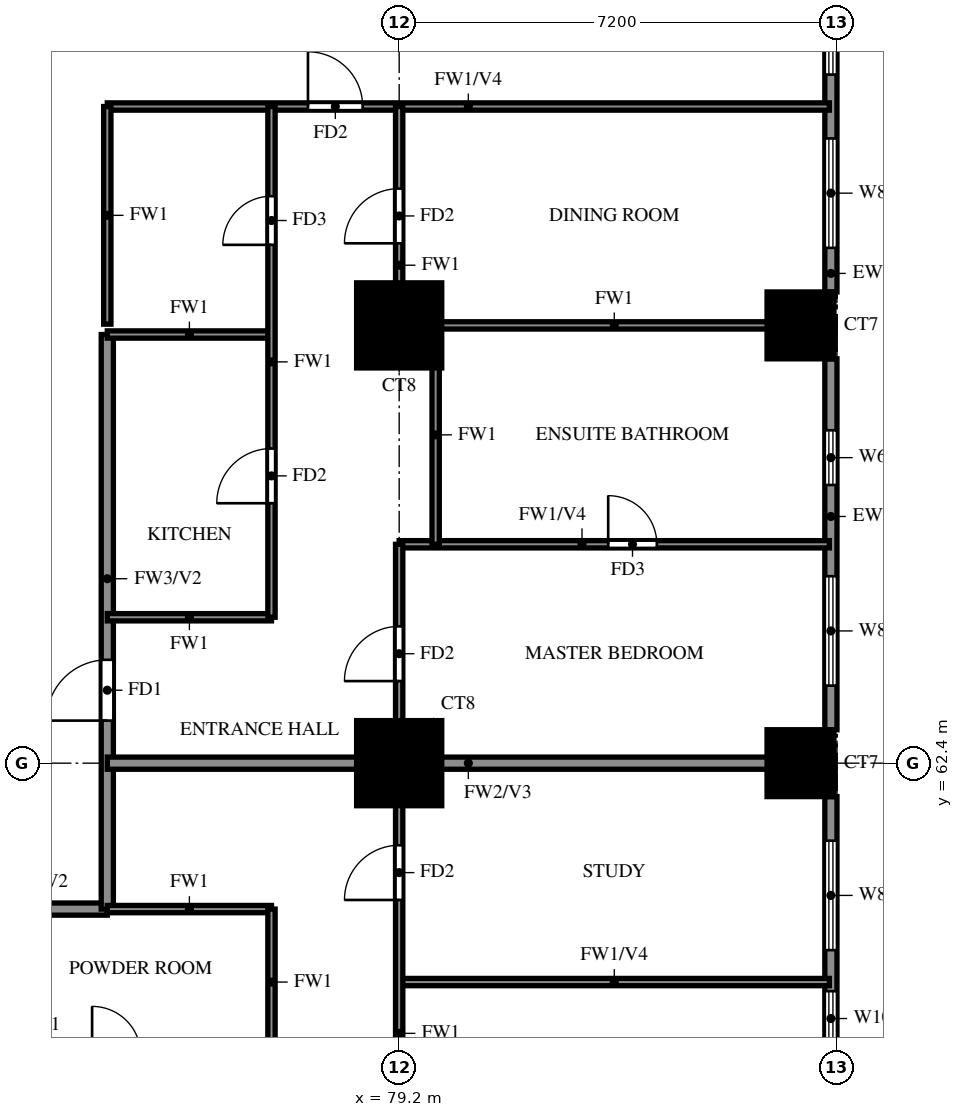
"""IFC4 building model, lengths in metres.
Left out: names, types, materials, properties, quantities, classifications, styles, units other than length and angle.
Written with IfcOpenShell. Run it as: python <this file> out.ifc"""

import sys

from ifc_helpers import new_model, si_unit, direction, frame, frame_2d, origin, origin_2d, place, context, subcontext, project, spatial, rectangle, extrude, source, transform, mapped, element, fill, save


model = new_model("IFC4")
c1 = context("Model", 3, precision=1e-05, world=origin(), true_north=direction((0.0, 1.0)))
c2 = subcontext(c1, "Body", "Model", "MODEL_VIEW")
j1 = project(units=[si_unit("LENGTHUNIT", "METRE"), si_unit("PLANEANGLEUNIT", "RADIAN")], contexts=[c1])
p1 = place(None, origin())
s1 = spatial("IfcSite", under=j1, at=p1, CompositionType="ELEMENT")
p2 = place(p1, origin())
s2 = spatial("IfcBuilding", under=s1, at=p2, CompositionType="ELEMENT")
p3 = place(p2, frame((0.0, 0.0, 44.5)))
s3 = spatial("IfcBuildingStorey", under=s2, at=p3, CompositionType="ELEMENT", Elevation=44.5)
m1 = source(origin(), c2, "Body", "SweptSolid", [
    extrude(rectangle(XDim=1.4, YDim=1.4, at=origin_2d()), origin(), (0.0, 0.0, 1.0), 3.18),
])
p4 = place(p3, frame((79.2, 62.4, 0.0), z_axis=(0.0, 0.0, 1.0), x_axis=(1.0, 0.0, 0.0)))
e1 = element("IfcColumn", 1, at=p4, inside=s3, PredefinedType="COLUMN", context=c2, shape_type="MappedRepresentation", body=[
    mapped(m1, transform((0.0, 0.0, 0.0))),
])
m2 = source(origin(), c2, "Body", "SweptSolid", [
    extrude(rectangle(XDim=1.1, YDim=1.1, at=origin_2d()), origin(), (0.0, 0.0, 1.0), 3.18),
])
p5 = place(p3, frame((85.8, 62.4, 0.0), z_axis=(0.0, 0.0, 1.0), x_axis=(1.0, 0.0, 0.0)))
e2 = element("IfcColumn", 2, at=p5, inside=s3, PredefinedType="COLUMN", context=c2, shape_type="MappedRepresentation", body=[
    mapped(m2, transform((0.0, 0.0, 0.0))),
])
p6 = place(p3, frame((79.2, 69.6, 0.0), z_axis=(0.0, 0.0, 1.0), x_axis=(1.0, 0.0, 0.0)))
e3 = element("IfcColumn", 3, at=p6, inside=s3, PredefinedType="COLUMN", context=c2, shape_type="MappedRepresentation", body=[
    mapped(m1, transform((0.0, 0.0, 0.0))),
])
p7 = place(p3, frame((85.8, 69.6, 0.0), z_axis=(0.0, 0.0, 1.0), x_axis=(1.0, 0.0, 0.0)))
e4 = element("IfcColumn", 4, at=p7, inside=s3, PredefinedType="COLUMN", context=c2, shape_type="MappedRepresentation", body=[
    mapped(m2, transform((0.0, 0.0, 0.0))),
])
p8 = place(p3, frame((86.3, 55.75, 0.0), z_axis=(0.0, 0.0, 1.0), x_axis=(0.0, 1.0, 0.0)))
e5 = element("IfcWall", 5, at=p8, inside=s3, PredefinedType="SOLIDWALL", context=c2, shape_type="SweptSolid", body=[
    extrude(rectangle(XDim=6.1, YDim=0.2, at=frame_2d((3.05, 0.0))), origin(), (0.0, 0.0, 1.0), 3.18),
])
p9 = place(p8, frame((2.0, 0.0, 0.6)))
e6 = element("IfcOpeningElement", 6, at=p9, cuts=e5, PredefinedType="OPENING", context=c2, shape_type="SweptSolid", body=[
    extrude(rectangle(XDim=0.9, YDim=2.4, at=frame_2d((0.45, 1.2))), frame((0.0, 0.11, 0.0), z_axis=(0.0, -1.0, 0.0), x_axis=(1.0, 0.0, 0.0)), (0.0, 0.0, 1.0), 0.22),
])
p10 = place(p8, frame((3.575, 0.0, 0.6)))
e7 = element("IfcOpeningElement", 7, at=p10, cuts=e5, PredefinedType="OPENING", context=c2, shape_type="SweptSolid", body=[
    extrude(rectangle(XDim=1.8, YDim=2.4, at=frame_2d((0.9, 1.2))), frame((0.0, 0.11, 0.0), z_axis=(0.0, -1.0, 0.0), x_axis=(1.0, 0.0, 0.0)), (0.0, 0.0, 1.0), 0.22),
])
p11 = place(p3, frame((86.3, 62.95, 0.0), z_axis=(0.0, 0.0, 1.0), x_axis=(0.0, 1.0, 0.0)))
e8 = element("IfcWall", 8, at=p11, inside=s3, PredefinedType="SOLIDWALL", context=c2, shape_type="SweptSolid", body=[
    extrude(rectangle(XDim=6.1, YDim=0.2, at=frame_2d((3.05, 0.0))), origin(), (0.0, 0.0, 1.0), 3.18),
])
p12 = place(p11, frame((0.725, 0.0, 0.6)))
e9 = element("IfcOpeningElement", 9, at=p12, cuts=e8, PredefinedType="OPENING", context=c2, shape_type="SweptSolid", body=[
    extrude(rectangle(XDim=1.8, YDim=2.4, at=frame_2d((0.9, 1.2))), frame((0.0, 0.11, 0.0), z_axis=(0.0, -1.0, 0.0), x_axis=(1.0, 0.0, 0.0)), (0.0, 0.0, 1.0), 0.22),
])
p13 = place(p11, frame((4.025, 0.0, 1.5)))
e10 = element("IfcOpeningElement", 10, at=p13, cuts=e8, PredefinedType="OPENING", context=c2, shape_type="SweptSolid", body=[
    extrude(rectangle(XDim=0.9, YDim=0.9, at=frame_2d((0.45, 0.45))), frame((0.0, 0.11, 0.0), z_axis=(0.0, -1.0, 0.0), x_axis=(1.0, 0.0, 0.0)), (0.0, 0.0, 1.0), 0.22),
])
p14 = place(p3, frame((86.3, 70.15, 0.0), z_axis=(0.0, 0.0, 1.0), x_axis=(0.0, 1.0, 0.0)))
e11 = element("IfcWall", 11, at=p14, inside=s3, PredefinedType="SOLIDWALL", context=c2, shape_type="SweptSolid", body=[
    extrude(rectangle(XDim=6.1, YDim=0.2, at=frame_2d((3.05, 0.0))), origin(), (0.0, 0.0, 1.0), 3.18),
])
p15 = place(p14, frame((0.725, 0.0, 0.6)))
e12 = element("IfcOpeningElement", 12, at=p15, cuts=e11, PredefinedType="OPENING", context=c2, shape_type="SweptSolid", body=[
    extrude(rectangle(XDim=1.8, YDim=2.4, at=frame_2d((0.9, 1.2))), frame((0.0, 0.11, 0.0), z_axis=(0.0, -1.0, 0.0), x_axis=(1.0, 0.0, 0.0)), (0.0, 0.0, 1.0), 0.22),
])
p16 = place(p14, frame((3.575, 0.0, 0.6)))
e13 = element("IfcOpeningElement", 13, at=p16, cuts=e11, PredefinedType="OPENING", context=c2, shape_type="SweptSolid", body=[
    extrude(rectangle(XDim=1.8, YDim=2.4, at=frame_2d((0.9, 1.2))), frame((0.0, 0.11, 0.0), z_axis=(0.0, -1.0, 0.0), x_axis=(1.0, 0.0, 0.0)), (0.0, 0.0, 1.0), 0.22),
])
p17 = place(p3, frame((72.0, 60.0, 0.0), z_axis=(0.0, 0.0, 1.0), x_axis=(1.0, 0.0, 0.0)))
e14 = element("IfcWall", 14, at=p17, inside=s3, PredefinedType="SOLIDWALL", context=c2, shape_type="SweptSolid", body=[
    extrude(rectangle(XDim=2.4, YDim=0.2, at=frame_2d((1.2, 0.0))), origin(), (0.0, 0.0, 1.0), 3.18),
])
p18 = place(p3, frame((74.4, 60.0, 0.0), z_axis=(0.0, 0.0, 1.0), x_axis=(0.0, 1.0, 0.0)))
e15 = element("IfcWall", 15, at=p18, inside=s3, PredefinedType="SOLIDWALL", context=c2, shape_type="SweptSolid", body=[
    extrude(rectangle(XDim=9.45, YDim=0.2, at=frame_2d((4.725, 0.0))), origin(), (0.0, 0.0, 1.0), 3.18),
])
p19 = place(p18, frame((3.1, 0.0, 0.0)))
e16 = element("IfcOpeningElement", 16, at=p19, cuts=e15, PredefinedType="OPENING", context=c2, shape_type="SweptSolid", body=[
    extrude(rectangle(XDim=1.0, YDim=2.1, at=frame_2d((0.5, 1.05))), frame((0.0, 0.11, 0.0), z_axis=(0.0, -1.0, 0.0), x_axis=(1.0, 0.0, 0.0)), (0.0, 0.0, 1.0), 0.22),
])
p20 = place(p3, frame((74.4, 62.4, 0.0), z_axis=(0.0, 0.0, 1.0), x_axis=(1.0, 0.0, 0.0)))
e17 = element("IfcWall", 17, at=p20, inside=s3, PredefinedType="SOLIDWALL", context=c2, shape_type="SweptSolid", body=[
    extrude(rectangle(XDim=11.875, YDim=0.2, at=frame_2d((5.938, 0.0))), origin(), (0.0, 0.0, 1.0), 3.18),
])
p21 = place(p3, frame((79.2, 58.8, 0.0), z_axis=(0.0, 0.0, 1.0), x_axis=(1.0, 0.0, 0.0)))
e18 = element("IfcWall", 18, at=p21, inside=s3, PredefinedType="PARTITIONING", context=c2, shape_type="SweptSolid", body=[
    extrude(rectangle(XDim=7.075, YDim=0.12, at=frame_2d((3.538, 0.0))), origin(), (0.0, 0.0, 1.0), 2.28),
])
for number, where, z_axis, x_axis in (
    (19, (74.4, 60.0, 0.0), (0.0, 0.0, 1.0), (1.0, 0.0, 0.0)),
    (20, (74.4, 64.8, 0.0), (0.0, 0.0, 1.0), (1.0, 0.0, 0.0)),
):
    element("IfcWall", number, at=place(p3, frame(where, z_axis=z_axis, x_axis=x_axis)), inside=s3, PredefinedType="PARTITIONING", context=c2, shape_type="SweptSolid", body=[
        extrude(rectangle(XDim=2.7, YDim=0.12, at=frame_2d((1.35, 0.0))), origin(), (0.0, 0.0, 1.0), 3.18),
    ])
p22 = place(p3, frame((79.2, 66.0, 0.0), z_axis=(0.0, 0.0, 1.0), x_axis=(1.0, 0.0, 0.0)))
e21 = element("IfcWall", 21, at=p22, inside=s3, PredefinedType="PARTITIONING", context=c2, shape_type="SweptSolid", body=[
    extrude(rectangle(XDim=7.075, YDim=0.12, at=frame_2d((3.538, 0.0))), origin(), (0.0, 0.0, 1.0), 2.28),
])
p23 = place(p22, frame((3.438, 0.0, 0.0)))
e22 = element("IfcOpeningElement", 22, at=p23, cuts=e21, PredefinedType="OPENING", context=c2, shape_type="SweptSolid", body=[
    extrude(rectangle(XDim=0.8, YDim=2.1, at=frame_2d((0.4, 1.05))), frame((0.0, 0.07, 0.0), z_axis=(0.0, -1.0, 0.0), x_axis=(1.0, 0.0, 0.0)), (0.0, 0.0, 1.0), 0.14),
])
p24 = place(p3, frame((74.4, 69.45, 0.0), z_axis=(0.0, 0.0, 1.0), x_axis=(1.0, 0.0, 0.0)))
e23 = element("IfcWall", 23, at=p24, inside=s3, PredefinedType="PARTITIONING", context=c2, shape_type="SweptSolid", body=[
    extrude(rectangle(XDim=2.7, YDim=0.12, at=frame_2d((1.35, 0.0))), origin(), (0.0, 0.0, 1.0), 3.18),
])
p25 = place(p3, frame((79.2, 69.6, 0.0), z_axis=(0.0, 0.0, 1.0), x_axis=(1.0, 0.0, 0.0)))
e24 = element("IfcWall", 24, at=p25, inside=s3, PredefinedType="PARTITIONING", context=c2, shape_type="SweptSolid", body=[
    extrude(rectangle(XDim=7.075, YDim=0.12, at=frame_2d((3.538, 0.0))), origin(), (0.0, 0.0, 1.0), 3.18),
])
p26 = place(p3, frame((74.4, 73.2, 0.0), z_axis=(0.0, 0.0, 1.0), x_axis=(1.0, 0.0, 0.0)))
e25 = element("IfcWall", 25, at=p26, inside=s3, PredefinedType="PARTITIONING", context=c2, shape_type="SweptSolid", body=[
    extrude(rectangle(XDim=11.875, YDim=0.12, at=frame_2d((5.938, 0.0))), origin(), (0.0, 0.0, 1.0), 2.28),
])
p27 = place(p26, frame((3.3, 0.0, 0.0)))
e26 = element("IfcOpeningElement", 26, at=p27, cuts=e25, PredefinedType="OPENING", context=c2, shape_type="SweptSolid", body=[
    extrude(rectangle(XDim=0.9, YDim=2.1, at=frame_2d((0.45, 1.05))), frame((0.0, 0.07, 0.0), z_axis=(0.0, -1.0, 0.0), x_axis=(1.0, 0.0, 0.0)), (0.0, 0.0, 1.0), 0.14),
])
p28 = place(p3, frame((74.4, 69.62, 0.0), z_axis=(0.0, 0.0, 1.0), x_axis=(0.0, 1.0, 0.0)))
e27 = element("IfcWall", 27, at=p28, inside=s3, PredefinedType="PARTITIONING", context=c2, shape_type="SweptSolid", body=[
    extrude(rectangle(XDim=3.58, YDim=0.12, at=frame_2d((1.79, 0.0))), origin(), (0.0, 0.0, 1.0), 3.18),
])
p29 = place(p3, frame((77.1, 57.6, 0.0), z_axis=(0.0, 0.0, 1.0), x_axis=(0.0, 1.0, 0.0)))
e28 = element("IfcWall", 28, at=p29, inside=s3, PredefinedType="PARTITIONING", context=c2, shape_type="SweptSolid", body=[
    extrude(rectangle(XDim=2.4, YDim=0.12, at=frame_2d((1.2, 0.0))), origin(), (0.0, 0.0, 1.0), 3.18),
])
p30 = place(p3, frame((77.1, 64.8, 0.0), z_axis=(0.0, 0.0, 1.0), x_axis=(0.0, 1.0, 0.0)))
e29 = element("IfcWall", 29, at=p30, inside=s3, PredefinedType="PARTITIONING", context=c2, shape_type="SweptSolid", body=[
    extrude(rectangle(XDim=8.4, YDim=0.12, at=frame_2d((4.2, 0.0))), origin(), (0.0, 0.0, 1.0), 3.18),
])
p31 = place(p30, frame((1.875, 0.0, 0.0)))
e30 = element("IfcOpeningElement", 30, at=p31, cuts=e29, PredefinedType="OPENING", context=c2, shape_type="SweptSolid", body=[
    extrude(rectangle(XDim=0.9, YDim=2.1, at=frame_2d((0.45, 1.05))), frame((0.0, 0.07, 0.0), z_axis=(0.0, -1.0, 0.0), x_axis=(1.0, 0.0, 0.0)), (0.0, 0.0, 1.0), 0.14),
])
p32 = place(p30, frame((6.125, 0.0, 0.0)))
e31 = element("IfcOpeningElement", 31, at=p32, cuts=e29, PredefinedType="OPENING", context=c2, shape_type="SweptSolid", body=[
    extrude(rectangle(XDim=0.8, YDim=2.1, at=frame_2d((0.4, 1.05))), frame((0.0, 0.07, 0.0), z_axis=(0.0, -1.0, 0.0), x_axis=(1.0, 0.0, 0.0)), (0.0, 0.0, 1.0), 0.14),
])
p33 = place(p3, frame((79.2, 48.125, 0.0), z_axis=(0.0, 0.0, 1.0), x_axis=(0.0, 1.0, 0.0)))
e32 = element("IfcWall", 32, at=p33, inside=s3, PredefinedType="PARTITIONING", context=c2, shape_type="SweptSolid", body=[
    extrude(rectangle(XDim=17.875, YDim=0.12, at=frame_2d((8.938, 0.0))), origin(), (0.0, 0.0, 1.0), 3.18),
])
p34 = place(p33, frame((1.288, 0.0, 0.0)))
e33 = element("IfcOpeningElement", 33, at=p34, cuts=e32, PredefinedType="OPENING", context=c2, shape_type="SweptSolid", body=[
    extrude(rectangle(XDim=0.9, YDim=2.1, at=frame_2d((0.45, 1.05))), frame((0.0, 0.07, 0.0), z_axis=(0.0, -1.0, 0.0), x_axis=(1.0, 0.0, 0.0)), (0.0, 0.0, 1.0), 0.14),
])
p35 = place(p33, frame((7.825, 0.0, 0.0)))
e34 = element("IfcOpeningElement", 34, at=p35, cuts=e32, PredefinedType="OPENING", context=c2, shape_type="SweptSolid", body=[
    extrude(rectangle(XDim=1.5, YDim=2.1, at=frame_2d((0.75, 1.05))), frame((0.0, 0.07, 0.0), z_axis=(0.0, -1.0, 0.0), x_axis=(1.0, 0.0, 0.0)), (0.0, 0.0, 1.0), 0.14),
])
p36 = place(p33, frame((12.025, 0.0, 0.0)))
e35 = element("IfcOpeningElement", 35, at=p36, cuts=e32, PredefinedType="OPENING", context=c2, shape_type="SweptSolid", body=[
    extrude(rectangle(XDim=0.9, YDim=2.1, at=frame_2d((0.45, 1.05))), frame((0.0, 0.07, 0.0), z_axis=(0.0, -1.0, 0.0), x_axis=(1.0, 0.0, 0.0)), (0.0, 0.0, 1.0), 0.14),
])
p37 = place(p33, frame((15.625, 0.0, 0.0)))
e36 = element("IfcOpeningElement", 36, at=p37, cuts=e32, PredefinedType="OPENING", context=c2, shape_type="SweptSolid", body=[
    extrude(rectangle(XDim=0.9, YDim=2.1, at=frame_2d((0.45, 1.05))), frame((0.0, 0.07, 0.0), z_axis=(0.0, -1.0, 0.0), x_axis=(1.0, 0.0, 0.0)), (0.0, 0.0, 1.0), 0.14),
])
p38 = place(p3, frame((79.2, 69.6, 0.0), z_axis=(0.0, 0.0, 1.0), x_axis=(0.0, 1.0, 0.0)))
e37 = element("IfcWall", 37, at=p38, inside=s3, PredefinedType="PARTITIONING", context=c2, shape_type="SweptSolid", body=[
    extrude(rectangle(XDim=3.6, YDim=0.12, at=frame_2d((1.8, 0.0))), origin(), (0.0, 0.0, 1.0), 3.18),
])
p39 = place(p38, frame((1.35, 0.0, 0.0)))
e38 = element("IfcOpeningElement", 38, at=p39, cuts=e37, PredefinedType="OPENING", context=c2, shape_type="SweptSolid", body=[
    extrude(rectangle(XDim=0.9, YDim=2.1, at=frame_2d((0.45, 1.05))), frame((0.0, 0.07, 0.0), z_axis=(0.0, -1.0, 0.0), x_axis=(1.0, 0.0, 0.0)), (0.0, 0.0, 1.0), 0.14),
])
p40 = place(p3, frame((79.8, 66.0, 0.0), z_axis=(0.0, 0.0, 1.0), x_axis=(0.0, 1.0, 0.0)))
e39 = element("IfcWall", 39, at=p40, inside=s3, PredefinedType="PARTITIONING", context=c2, shape_type="SweptSolid", body=[
    extrude(rectangle(XDim=3.6, YDim=0.12, at=frame_2d((1.8, 0.0))), origin(), (0.0, 0.0, 1.0), 3.18),
])
p41 = place(p9, origin())
e40 = element("IfcWindow", 40, at=p41, inside=s3, PartitioningType="SINGLE_PANEL", PredefinedType="WINDOW", context=c2, shape_type="SweptSolid", body=[
    extrude(rectangle(XDim=0.9, YDim=2.4, at=frame_2d((0.45, 1.2))), frame((0.0, 0.03, 0.0), z_axis=(0.0, -1.0, 0.0), x_axis=(1.0, 0.0, 0.0)), (0.0, 0.0, 1.0), 0.06),
])
fill(e6, e40)
p42 = place(p10, origin())
e41 = element("IfcWindow", 41, at=p42, inside=s3, PartitioningType="DOUBLE_PANEL_VERTICAL", PredefinedType="WINDOW", context=c2, shape_type="SweptSolid", body=[
    extrude(rectangle(XDim=1.8, YDim=2.4, at=frame_2d((0.9, 1.2))), frame((0.0, 0.03, 0.0), z_axis=(0.0, -1.0, 0.0), x_axis=(1.0, 0.0, 0.0)), (0.0, 0.0, 1.0), 0.06),
])
fill(e7, e41)
p43 = place(p12, origin())
e42 = element("IfcWindow", 42, at=p43, inside=s3, PartitioningType="DOUBLE_PANEL_VERTICAL", PredefinedType="WINDOW", context=c2, shape_type="SweptSolid", body=[
    extrude(rectangle(XDim=1.8, YDim=2.4, at=frame_2d((0.9, 1.2))), frame((0.0, 0.03, 0.0), z_axis=(0.0, -1.0, 0.0), x_axis=(1.0, 0.0, 0.0)), (0.0, 0.0, 1.0), 0.06),
])
fill(e9, e42)
p44 = place(p13, origin())
e43 = element("IfcWindow", 43, at=p44, inside=s3, PartitioningType="SINGLE_PANEL", PredefinedType="WINDOW", context=c2, shape_type="SweptSolid", body=[
    extrude(rectangle(XDim=0.9, YDim=0.9, at=frame_2d((0.45, 0.45))), frame((0.0, 0.03, 0.0), z_axis=(0.0, -1.0, 0.0), x_axis=(1.0, 0.0, 0.0)), (0.0, 0.0, 1.0), 0.06),
])
fill(e10, e43)
p45 = place(p15, origin())
e44 = element("IfcWindow", 44, at=p45, inside=s3, PartitioningType="DOUBLE_PANEL_VERTICAL", PredefinedType="WINDOW", context=c2, shape_type="SweptSolid", body=[
    extrude(rectangle(XDim=1.8, YDim=2.4, at=frame_2d((0.9, 1.2))), frame((0.0, 0.03, 0.0), z_axis=(0.0, -1.0, 0.0), x_axis=(1.0, 0.0, 0.0)), (0.0, 0.0, 1.0), 0.06),
])
fill(e12, e44)
p46 = place(p16, origin())
e45 = element("IfcWindow", 45, at=p46, inside=s3, PartitioningType="DOUBLE_PANEL_VERTICAL", PredefinedType="WINDOW", context=c2, shape_type="SweptSolid", body=[
    extrude(rectangle(XDim=1.8, YDim=2.4, at=frame_2d((0.9, 1.2))), frame((0.0, 0.03, 0.0), z_axis=(0.0, -1.0, 0.0), x_axis=(1.0, 0.0, 0.0)), (0.0, 0.0, 1.0), 0.06),
])
fill(e13, e45)
p47 = place(p36, origin())
e46 = element("IfcDoor", 46, at=p47, inside=s3, OperationType="SINGLE_SWING_LEFT", PredefinedType="DOOR", context=c2, shape_type="SweptSolid", body=[
    extrude(rectangle(XDim=0.9, YDim=2.1, at=frame_2d((0.45, 1.05))), frame((0.0, 0.025, 0.0), z_axis=(0.0, -1.0, 0.0), x_axis=(1.0, 0.0, 0.0)), (0.0, 0.0, 1.0), 0.05),
])
fill(e35, e46)
p48 = place(p19, origin())
e47 = element("IfcDoor", 47, at=p48, inside=s3, OperationType="SINGLE_SWING_LEFT", PredefinedType="DOOR", context=c2, shape_type="SweptSolid", body=[
    extrude(rectangle(XDim=1.0, YDim=2.1, at=frame_2d((0.5, 1.05))), frame((0.0, 0.025, 0.0), z_axis=(0.0, -1.0, 0.0), x_axis=(1.0, 0.0, 0.0)), (0.0, 0.0, 1.0), 0.05),
])
fill(e16, e47)
p49 = place(p37, origin())
e48 = element("IfcDoor", 48, at=p49, inside=s3, OperationType="SINGLE_SWING_RIGHT", PredefinedType="DOOR", context=c2, shape_type="SweptSolid", body=[
    extrude(rectangle(XDim=0.9, YDim=2.1, at=frame_2d((0.45, 1.05))), frame((0.0, 0.025, 0.0), z_axis=(0.0, -1.0, 0.0), x_axis=(1.0, 0.0, 0.0)), (0.0, 0.0, 1.0), 0.05),
])
fill(e36, e48)
p50 = place(p23, origin())
e49 = element("IfcDoor", 49, at=p50, inside=s3, OperationType="SINGLE_SWING_LEFT", PredefinedType="DOOR", context=c2, shape_type="SweptSolid", body=[
    extrude(rectangle(XDim=0.8, YDim=2.1, at=frame_2d((0.4, 1.05))), frame((0.0, 0.025, 0.0), z_axis=(0.0, -1.0, 0.0), x_axis=(1.0, 0.0, 0.0)), (0.0, 0.0, 1.0), 0.05),
])
fill(e22, e49)
p51 = place(p39, origin())
e50 = element("IfcDoor", 50, at=p51, inside=s3, OperationType="SINGLE_SWING_LEFT", PredefinedType="DOOR", context=c2, shape_type="SweptSolid", body=[
    extrude(rectangle(XDim=0.9, YDim=2.1, at=frame_2d((0.45, 1.05))), frame((0.0, 0.025, 0.0), z_axis=(0.0, -1.0, 0.0), x_axis=(1.0, 0.0, 0.0)), (0.0, 0.0, 1.0), 0.05),
])
fill(e38, e50)
p52 = place(p27, origin())
e51 = element("IfcDoor", 51, at=p52, inside=s3, OperationType="SINGLE_SWING_RIGHT", PredefinedType="DOOR", context=c2, shape_type="SweptSolid", body=[
    extrude(rectangle(XDim=0.9, YDim=2.1, at=frame_2d((0.45, 1.05))), frame((0.0, 0.025, 0.0), z_axis=(0.0, -1.0, 0.0), x_axis=(1.0, 0.0, 0.0)), (0.0, 0.0, 1.0), 0.05),
])
fill(e26, e51)
p53 = place(p31, origin())
e52 = element("IfcDoor", 52, at=p53, inside=s3, OperationType="SINGLE_SWING_LEFT", PredefinedType="DOOR", context=c2, shape_type="SweptSolid", body=[
    extrude(rectangle(XDim=0.9, YDim=2.1, at=frame_2d((0.45, 1.05))), frame((0.0, 0.025, 0.0), z_axis=(0.0, -1.0, 0.0), x_axis=(1.0, 0.0, 0.0)), (0.0, 0.0, 1.0), 0.05),
])
fill(e30, e52)
p54 = place(p32, origin())
e53 = element("IfcDoor", 53, at=p54, inside=s3, OperationType="SINGLE_SWING_LEFT", PredefinedType="DOOR", context=c2, shape_type="SweptSolid", body=[
    extrude(rectangle(XDim=0.8, YDim=2.1, at=frame_2d((0.4, 1.05))), frame((0.0, 0.025, 0.0), z_axis=(0.0, -1.0, 0.0), x_axis=(1.0, 0.0, 0.0)), (0.0, 0.0, 1.0), 0.05),
])
fill(e31, e53)
save(model, sys.argv[1])
